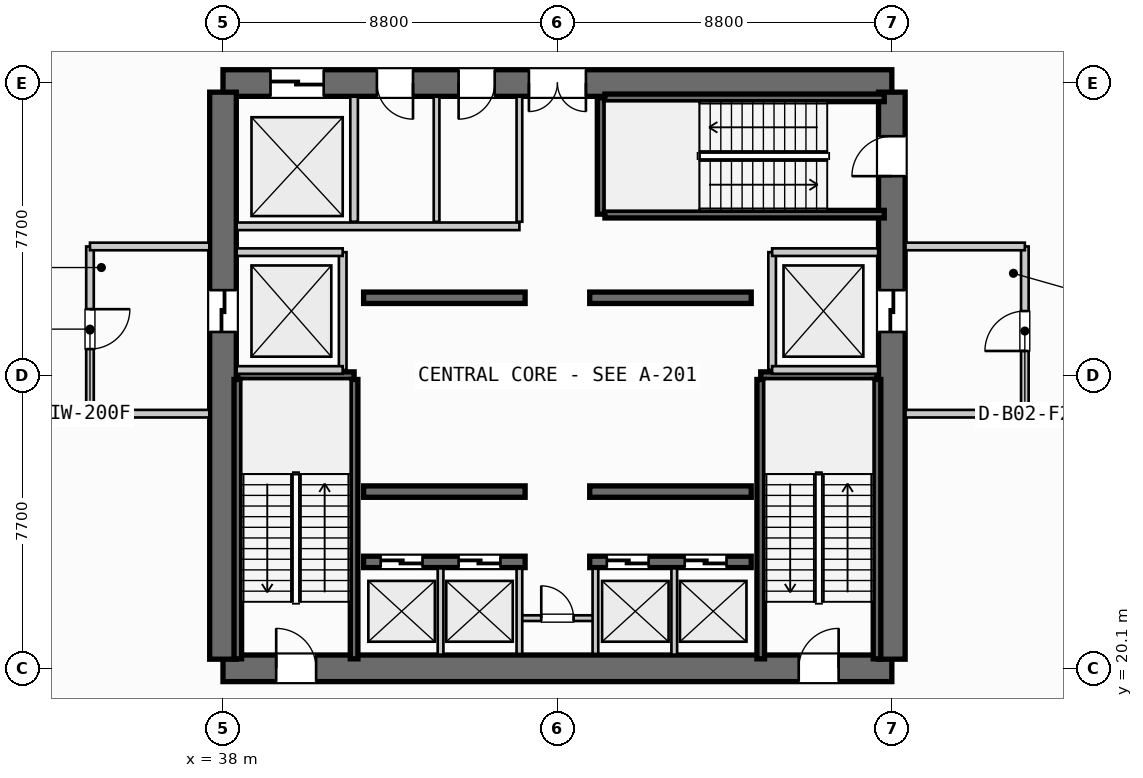
"""IFC4 building model, lengths in metres.
Left out: names, types, materials, properties, quantities, classifications, styles, units other than length and angle.
Written with IfcOpenShell. Run it as: python <this file> out.ifc"""

import sys

from ifc_helpers import new_model, si_unit, direction, frame, frame_2d, origin, place, context, subcontext, project, spatial, rectangle, extrude, source, transform, mapped, element, fill, save


model = new_model("IFC4")
c1 = context("Model", 3, precision=1e-05, world=origin(), true_north=direction((0.0, 1.0)))
c2 = subcontext(c1, "Body", "Model", "MODEL_VIEW")
j1 = project(units=[si_unit("LENGTHUNIT", "METRE"), si_unit("PLANEANGLEUNIT", "RADIAN")], contexts=[c1])
p1 = place(None, origin())
s1 = spatial("IfcSite", under=j1, at=p1, CompositionType="ELEMENT")
p2 = place(p1, origin())
s2 = spatial("IfcBuilding", under=s1, at=p2, CompositionType="ELEMENT")
p3 = place(p2, frame((0.0, 0.0, -9.0)))
s3 = spatial("IfcBuildingStorey", under=s2, at=p3, CompositionType="ELEMENT", Elevation=-9.0)
p4 = place(p3, frame((38.0, 20.1, 0.0), z_axis=(0.0, 0.0, 1.0), x_axis=(1.0, 0.0, 0.0)))
e1 = element("IfcWall", 1, at=p4, inside=s3, PredefinedType="SHEAR", context=c2, shape_type="SweptSolid", body=[
    extrude(rectangle(XDim=17.6, YDim=0.7, at=frame_2d((8.8, 0.0))), origin(), (0.0, 0.0, 1.0), 4.22),
])
p5 = place(p4, frame((1.4, 0.0, 0.0)))
e2 = element("IfcOpeningElement", 2, at=p5, cuts=e1, PredefinedType="OPENING", context=c2, shape_type="SweptSolid", body=[
    extrude(rectangle(XDim=1.05, YDim=2.15, at=frame_2d((0.525, 1.075))), frame((0.0, 0.36, 0.0), z_axis=(0.0, -1.0, 0.0), x_axis=(1.0, 0.0, 0.0)), (0.0, 0.0, 1.0), 0.72),
])
p6 = place(p4, frame((15.15, 0.0, 0.0)))
e3 = element("IfcOpeningElement", 3, at=p6, cuts=e1, PredefinedType="OPENING", context=c2, shape_type="SweptSolid", body=[
    extrude(rectangle(XDim=1.05, YDim=2.15, at=frame_2d((0.525, 1.075))), frame((0.0, 0.36, 0.0), z_axis=(0.0, -1.0, 0.0), x_axis=(1.0, 0.0, 0.0)), (0.0, 0.0, 1.0), 0.72),
])
p7 = place(p3, frame((55.6, 35.5, 0.0), z_axis=(0.0, 0.0, 1.0), x_axis=(-1.0, 0.0, 0.0)))
e4 = element("IfcWall", 4, at=p7, inside=s3, PredefinedType="SHEAR", context=c2, shape_type="SweptSolid", body=[
    extrude(rectangle(XDim=17.6, YDim=0.7, at=frame_2d((8.8, 0.0))), origin(), (0.0, 0.0, 1.0), 4.22),
])
p8 = place(p7, frame((8.05, 0.0, 0.0)))
e5 = element("IfcOpeningElement", 5, at=p8, cuts=e4, PredefinedType="OPENING", context=c2, shape_type="SweptSolid", body=[
    extrude(rectangle(XDim=1.5, YDim=2.2, at=frame_2d((0.75, 1.1))), frame((0.0, 0.36, 0.0), z_axis=(0.0, -1.0, 0.0), x_axis=(1.0, 0.0, 0.0)), (0.0, 0.0, 1.0), 0.72),
])
p9 = place(p7, frame((14.95, 0.0, 0.0)))
e6 = element("IfcOpeningElement", 6, at=p9, cuts=e4, PredefinedType="OPENING", context=c2, shape_type="SweptSolid", body=[
    extrude(rectangle(XDim=1.4, YDim=2.3, at=frame_2d((0.7, 1.15))), frame((0.0, 0.36, 0.0), z_axis=(0.0, -1.0, 0.0), x_axis=(1.0, 0.0, 0.0)), (0.0, 0.0, 1.0), 0.72),
])
p10 = place(p7, frame((12.6, 0.0, 0.0)))
e7 = element("IfcOpeningElement", 7, at=p10, cuts=e4, PredefinedType="OPENING", context=c2, shape_type="SweptSolid", body=[
    extrude(rectangle(XDim=0.95, YDim=2.15, at=frame_2d((0.475, 1.075))), frame((0.0, 0.36, 0.0), z_axis=(0.0, -1.0, 0.0), x_axis=(1.0, 0.0, 0.0)), (0.0, 0.0, 1.0), 0.72),
])
p11 = place(p7, frame((10.45, 0.0, 0.0)))
e8 = element("IfcOpeningElement", 8, at=p11, cuts=e4, PredefinedType="OPENING", context=c2, shape_type="SweptSolid", body=[
    extrude(rectangle(XDim=0.95, YDim=2.15, at=frame_2d((0.475, 1.075))), frame((0.0, 0.36, 0.0), z_axis=(0.0, -1.0, 0.0), x_axis=(1.0, 0.0, 0.0)), (0.0, 0.0, 1.0), 0.72),
])
p12 = place(p3, frame((38.0, 35.26, 0.0), z_axis=(0.0, 0.0, 1.0), x_axis=(0.0, -1.0, 0.0)))
e9 = element("IfcWall", 9, at=p12, inside=s3, PredefinedType="SHEAR", context=c2, shape_type="SweptSolid", body=[
    extrude(rectangle(XDim=14.92, YDim=0.7, at=frame_2d((7.46, 0.0))), origin(), (0.0, 0.0, 1.0), 4.22),
])
p13 = place(p12, frame((5.21, 0.0, 0.0)))
e10 = element("IfcOpeningElement", 10, at=p13, cuts=e9, PredefinedType="OPENING", context=c2, shape_type="SweptSolid", body=[
    extrude(rectangle(XDim=1.1, YDim=2.2, at=frame_2d((0.55, 1.1))), frame((0.0, 0.36, 0.0), z_axis=(0.0, -1.0, 0.0), x_axis=(1.0, 0.0, 0.0)), (0.0, 0.0, 1.0), 0.72),
])
p14 = place(p3, frame((55.6, 20.34, 0.0), z_axis=(0.0, 0.0, 1.0), x_axis=(0.0, 1.0, 0.0)))
e11 = element("IfcWall", 11, at=p14, inside=s3, PredefinedType="SHEAR", context=c2, shape_type="SweptSolid", body=[
    extrude(rectangle(XDim=14.92, YDim=0.7, at=frame_2d((7.46, 0.0))), origin(), (0.0, 0.0, 1.0), 4.22),
])
p15 = place(p14, frame((12.71, 0.0, 0.0)))
e12 = element("IfcOpeningElement", 12, at=p15, cuts=e11, PredefinedType="OPENING", context=c2, shape_type="SweptSolid", body=[
    extrude(rectangle(XDim=1.05, YDim=2.15, at=frame_2d((0.525, 1.075))), frame((0.0, 0.36, 0.0), z_axis=(0.0, -1.0, 0.0), x_axis=(1.0, 0.0, 0.0)), (0.0, 0.0, 1.0), 0.72),
])
p16 = place(p14, frame((8.61, 0.0, 0.0)))
e13 = element("IfcOpeningElement", 13, at=p16, cuts=e11, PredefinedType="OPENING", context=c2, shape_type="SweptSolid", body=[
    extrude(rectangle(XDim=1.1, YDim=2.2, at=frame_2d((0.55, 1.1))), frame((0.0, 0.36, 0.0), z_axis=(0.0, -1.0, 0.0), x_axis=(1.0, 0.0, 0.0)), (0.0, 0.0, 1.0), 0.72),
])
p17 = place(p3, frame((41.7, 22.9, 0.0), z_axis=(0.0, 0.0, 1.0), x_axis=(1.0, 0.0, 0.0)))
e14 = element("IfcWall", 14, at=p17, inside=s3, PredefinedType="SHEAR", context=c2, shape_type="SweptSolid", body=[
    extrude(rectangle(XDim=4.25, YDim=0.3, at=frame_2d((2.125, 0.0))), origin(), (0.0, 0.0, 1.0), 4.22),
])
p18 = place(p17, frame((0.45, 0.0, 0.0)))
e15 = element("IfcOpeningElement", 15, at=p18, cuts=e14, PredefinedType="OPENING", context=c2, shape_type="SweptSolid", body=[
    extrude(rectangle(XDim=1.1, YDim=2.2, at=frame_2d((0.55, 1.1))), frame((0.0, 0.16, 0.0), z_axis=(0.0, -1.0, 0.0), x_axis=(1.0, 0.0, 0.0)), (0.0, 0.0, 1.0), 0.32),
])
p19 = place(p17, frame((2.5, 0.0, 0.0)))
e16 = element("IfcOpeningElement", 16, at=p19, cuts=e14, PredefinedType="OPENING", context=c2, shape_type="SweptSolid", body=[
    extrude(rectangle(XDim=1.1, YDim=2.2, at=frame_2d((0.55, 1.1))), frame((0.0, 0.16, 0.0), z_axis=(0.0, -1.0, 0.0), x_axis=(1.0, 0.0, 0.0)), (0.0, 0.0, 1.0), 0.32),
])
p20 = place(p3, frame((47.65, 22.9, 0.0), z_axis=(0.0, 0.0, 1.0), x_axis=(1.0, 0.0, 0.0)))
e17 = element("IfcWall", 17, at=p20, inside=s3, PredefinedType="SHEAR", context=c2, shape_type="SweptSolid", body=[
    extrude(rectangle(XDim=4.25, YDim=0.3, at=frame_2d((2.125, 0.0))), origin(), (0.0, 0.0, 1.0), 4.22),
])
p21 = place(p20, frame((0.45, 0.0, 0.0)))
e18 = element("IfcOpeningElement", 18, at=p21, cuts=e17, PredefinedType="OPENING", context=c2, shape_type="SweptSolid", body=[
    extrude(rectangle(XDim=1.1, YDim=2.2, at=frame_2d((0.55, 1.1))), frame((0.0, 0.16, 0.0), z_axis=(0.0, -1.0, 0.0), x_axis=(1.0, 0.0, 0.0)), (0.0, 0.0, 1.0), 0.32),
])
p22 = place(p20, frame((2.5, 0.0, 0.0)))
e19 = element("IfcOpeningElement", 19, at=p22, cuts=e17, PredefinedType="OPENING", context=c2, shape_type="SweptSolid", body=[
    extrude(rectangle(XDim=1.1, YDim=2.2, at=frame_2d((0.55, 1.1))), frame((0.0, 0.16, 0.0), z_axis=(0.0, -1.0, 0.0), x_axis=(1.0, 0.0, 0.0)), (0.0, 0.0, 1.0), 0.32),
])
for number, where, z_axis, x_axis in (
    (20, (41.7, 24.75, 0.0), (0.0, 0.0, 1.0), (1.0, 0.0, 0.0)),
    (21, (47.65, 24.75, 0.0), (0.0, 0.0, 1.0), (1.0, 0.0, 0.0)),
    (22, (41.7, 29.85, 0.0), (0.0, 0.0, 1.0), (1.0, 0.0, 0.0)),
    (23, (47.65, 29.85, 0.0), (0.0, 0.0, 1.0), (1.0, 0.0, 0.0)),
):
    element("IfcWall", number, at=place(p3, frame(where, z_axis=z_axis, x_axis=x_axis)), inside=s3, PredefinedType="SHEAR", context=c2, shape_type="SweptSolid", body=[
        extrude(rectangle(XDim=4.25, YDim=0.3, at=frame_2d((2.125, 0.0))), origin(), (0.0, 0.0, 1.0), 4.22),
    ])
p23 = place(p3, frame((38.39, 27.8, 0.0), z_axis=(0.0, 0.0, 1.0), x_axis=(1.0, 0.0, 0.0)))
e24 = element("IfcWall", 24, at=p23, inside=s3, PredefinedType="SHEAR", context=c2, shape_type="SweptSolid", body=[
    extrude(rectangle(XDim=3.06, YDim=0.2, at=frame_2d((1.53, 0.0))), origin(), (0.0, 0.0, 1.0), 4.22),
])
for number, where, z_axis, x_axis in (
    (25, (41.45, 27.7, 0.0), (0.0, 0.0, 1.0), (0.0, -1.0, 0.0)),
    (26, (38.39, 20.35, 0.0), (0.0, 0.0, 1.0), (0.0, 1.0, 0.0)),
):
    element("IfcWall", number, at=place(p3, frame(where, z_axis=z_axis, x_axis=x_axis)), inside=s3, PredefinedType="SHEAR", context=c2, shape_type="SweptSolid", body=[
        extrude(rectangle(XDim=7.35, YDim=0.2, at=frame_2d((3.675, 0.0))), origin(), (0.0, 0.0, 1.0), 4.22),
    ])
p24 = place(p3, frame((52.15, 27.8, 0.0), z_axis=(0.0, 0.0, 1.0), x_axis=(1.0, 0.0, 0.0)))
e27 = element("IfcWall", 27, at=p24, inside=s3, PredefinedType="SHEAR", context=c2, shape_type="SweptSolid", body=[
    extrude(rectangle(XDim=3.06, YDim=0.2, at=frame_2d((1.53, 0.0))), origin(), (0.0, 0.0, 1.0), 4.22),
])
for number, where, z_axis, x_axis in (
    (28, (55.21, 27.7, 0.0), (0.0, 0.0, 1.0), (0.0, -1.0, 0.0)),
    (29, (52.15, 20.35, 0.0), (0.0, 0.0, 1.0), (0.0, 1.0, 0.0)),
):
    element("IfcWall", number, at=place(p3, frame(where, z_axis=z_axis, x_axis=x_axis)), inside=s3, PredefinedType="SHEAR", context=c2, shape_type="SweptSolid", body=[
        extrude(rectangle(XDim=7.35, YDim=0.2, at=frame_2d((3.675, 0.0))), origin(), (0.0, 0.0, 1.0), 4.22),
    ])
p25 = place(p3, frame((47.95, 32.05, 0.0), z_axis=(0.0, 0.0, 1.0), x_axis=(0.0, 1.0, 0.0)))
e30 = element("IfcWall", 30, at=p25, inside=s3, PredefinedType="SHEAR", context=c2, shape_type="SweptSolid", body=[
    extrude(rectangle(XDim=3.06, YDim=0.2, at=frame_2d((1.53, 0.0))), origin(), (0.0, 0.0, 1.0), 4.22),
])
for number, where, z_axis, x_axis in (
    (31, (48.05, 35.11, 0.0), (0.0, 0.0, 1.0), (1.0, 0.0, 0.0)),
    (32, (55.4, 32.05, 0.0), (0.0, 0.0, 1.0), (-1.0, 0.0, 0.0)),
):
    element("IfcWall", number, at=place(p3, frame(where, z_axis=z_axis, x_axis=x_axis)), inside=s3, PredefinedType="SHEAR", context=c2, shape_type="SweptSolid", body=[
        extrude(rectangle(XDim=7.35, YDim=0.2, at=frame_2d((3.675, 0.0))), origin(), (0.0, 0.0, 1.0), 4.22),
    ])
p26 = place(p3, frame((45.8, 21.42, 0.0), z_axis=(0.0, 0.0, 1.0), x_axis=(1.0, 0.0, 0.0)))
e33 = element("IfcWall", 33, at=p26, inside=s3, PredefinedType="PARTITIONING", context=c2, shape_type="SweptSolid", body=[
    extrude(rectangle(XDim=2.0, YDim=0.15, at=frame_2d((1.0, 0.0))), origin(), (0.0, 0.0, 1.0), 3.433),
])
p27 = place(p26, frame((0.575, 0.0, 0.0)))
e34 = element("IfcOpeningElement", 34, at=p27, cuts=e33, PredefinedType="OPENING", context=c2, shape_type="SweptSolid", body=[
    extrude(rectangle(XDim=0.85, YDim=2.15, at=frame_2d((0.425, 1.075))), frame((0.0, 0.085, 0.0), z_axis=(0.0, -1.0, 0.0), x_axis=(1.0, 0.0, 0.0)), (0.0, 0.0, 1.0), 0.17),
])
for number, where, z_axis, x_axis in (
    (35, (45.8, 20.48, 0.0), (0.0, 0.0, 1.0), (0.0, 1.0, 0.0)),
    (36, (47.8, 20.48, 0.0), (0.0, 0.0, 1.0), (0.0, 1.0, 0.0)),
):
    element("IfcWall", number, at=place(p3, frame(where, z_axis=z_axis, x_axis=x_axis)), inside=s3, PredefinedType="PARTITIONING", context=c2, shape_type="SweptSolid", body=[
        extrude(rectangle(XDim=2.24, YDim=0.15, at=frame_2d((1.12, 0.0))), origin(), (0.0, 0.0, 1.0), 3.433),
    ])
p28 = place(p3, frame((41.15, 27.95, 0.0), z_axis=(0.0, 0.0, 1.0), x_axis=(0.0, 1.0, 0.0)))
e37 = element("IfcWall", 37, at=p28, inside=s3, PredefinedType="PARTITIONING", context=c2, shape_type="SweptSolid", body=[
    extrude(rectangle(XDim=3.1, YDim=0.2, at=frame_2d((1.55, 0.0))), origin(), (0.0, 0.0, 1.0), 3.433),
])
for number, where, z_axis, x_axis in (
    (38, (38.36, 27.95, 0.0), (0.0, 0.0, 1.0), (1.0, 0.0, 0.0)),
    (39, (38.36, 31.05, 0.0), (0.0, 0.0, 1.0), (1.0, 0.0, 0.0)),
):
    element("IfcWall", number, at=place(p3, frame(where, z_axis=z_axis, x_axis=x_axis)), inside=s3, PredefinedType="PARTITIONING", context=c2, shape_type="SweptSolid", body=[
        extrude(rectangle(XDim=2.79, YDim=0.2, at=frame_2d((1.395, 0.0))), origin(), (0.0, 0.0, 1.0), 3.433),
    ])
p29 = place(p3, frame((34.5, 31.2, 0.0), z_axis=(0.0, 0.0, 1.0), x_axis=(0.0, -1.0, 0.0)))
e40 = element("IfcWall", 40, at=p29, inside=s3, PredefinedType="PARTITIONING", context=c2, shape_type="SweptSolid", body=[
    extrude(rectangle(XDim=4.4, YDim=0.2, at=frame_2d((2.2, 0.0))), origin(), (0.0, 0.0, 1.0), 3.433),
])
p30 = place(p29, frame((1.65, 0.0, 0.0)))
e41 = element("IfcOpeningElement", 41, at=p30, cuts=e40, PredefinedType="OPENING", context=c2, shape_type="SweptSolid", body=[
    extrude(rectangle(XDim=1.05, YDim=2.15, at=frame_2d((0.525, 1.075))), frame((0.0, 0.11, 0.0), z_axis=(0.0, -1.0, 0.0), x_axis=(1.0, 0.0, 0.0)), (0.0, 0.0, 1.0), 0.22),
])
for number, where, z_axis, x_axis in (
    (42, (34.5, 26.8, 0.0), (0.0, 0.0, 1.0), (1.0, 0.0, 0.0)),
    (43, (34.5, 31.2, 0.0), (0.0, 0.0, 1.0), (1.0, 0.0, 0.0)),
):
    element("IfcWall", number, at=place(p3, frame(where, z_axis=z_axis, x_axis=x_axis)), inside=s3, PredefinedType="PARTITIONING", context=c2, shape_type="SweptSolid", body=[
        extrude(rectangle(XDim=3.14, YDim=0.2, at=frame_2d((1.57, 0.0))), origin(), (0.0, 0.0, 1.0), 3.433),
    ])
p31 = place(p3, frame((52.45, 27.95, 0.0), z_axis=(0.0, 0.0, 1.0), x_axis=(0.0, 1.0, 0.0)))
e44 = element("IfcWall", 44, at=p31, inside=s3, PredefinedType="PARTITIONING", context=c2, shape_type="SweptSolid", body=[
    extrude(rectangle(XDim=3.1, YDim=0.2, at=frame_2d((1.55, 0.0))), origin(), (0.0, 0.0, 1.0), 3.433),
])
for number, where, z_axis, x_axis in (
    (45, (52.45, 27.95, 0.0), (0.0, 0.0, 1.0), (1.0, 0.0, 0.0)),
    (46, (52.45, 31.05, 0.0), (0.0, 0.0, 1.0), (1.0, 0.0, 0.0)),
):
    element("IfcWall", number, at=place(p3, frame(where, z_axis=z_axis, x_axis=x_axis)), inside=s3, PredefinedType="PARTITIONING", context=c2, shape_type="SweptSolid", body=[
        extrude(rectangle(XDim=2.79, YDim=0.2, at=frame_2d((1.395, 0.0))), origin(), (0.0, 0.0, 1.0), 3.433),
    ])
p32 = place(p3, frame((59.1, 26.8, 0.0), z_axis=(0.0, 0.0, 1.0), x_axis=(0.0, 1.0, 0.0)))
e47 = element("IfcWall", 47, at=p32, inside=s3, PredefinedType="PARTITIONING", context=c2, shape_type="SweptSolid", body=[
    extrude(rectangle(XDim=4.4, YDim=0.2, at=frame_2d((2.2, 0.0))), origin(), (0.0, 0.0, 1.0), 3.433),
])
p33 = place(p32, frame((1.65, 0.0, 0.0)))
e48 = element("IfcOpeningElement", 48, at=p33, cuts=e47, PredefinedType="OPENING", context=c2, shape_type="SweptSolid", body=[
    extrude(rectangle(XDim=1.05, YDim=2.15, at=frame_2d((0.525, 1.075))), frame((0.0, 0.11, 0.0), z_axis=(0.0, -1.0, 0.0), x_axis=(1.0, 0.0, 0.0)), (0.0, 0.0, 1.0), 0.22),
])
for number, where, z_axis, x_axis in (
    (49, (55.96, 26.8, 0.0), (0.0, 0.0, 1.0), (1.0, 0.0, 0.0)),
    (50, (55.96, 31.2, 0.0), (0.0, 0.0, 1.0), (1.0, 0.0, 0.0)),
):
    element("IfcWall", number, at=place(p3, frame(where, z_axis=z_axis, x_axis=x_axis)), inside=s3, PredefinedType="PARTITIONING", context=c2, shape_type="SweptSolid", body=[
        extrude(rectangle(XDim=3.14, YDim=0.2, at=frame_2d((1.57, 0.0))), origin(), (0.0, 0.0, 1.0), 3.433),
    ])
for number, where, z_axis, x_axis in (
    (51, (43.725, 20.46, 0.0), (0.0, 0.0, 1.0), (0.0, 1.0, 0.0)),
    (52, (49.875, 20.46, 0.0), (0.0, 0.0, 1.0), (0.0, 1.0, 0.0)),
):
    element("IfcWall", number, at=place(p3, frame(where, z_axis=z_axis, x_axis=x_axis)), inside=s3, PredefinedType="PARTITIONING", context=c2, shape_type="SweptSolid", body=[
        extrude(rectangle(XDim=2.27, YDim=0.15, at=frame_2d((1.135, 0.0))), origin(), (0.0, 0.0, 1.0), 3.433),
    ])
p34 = place(p3, frame((41.45, 31.85, 0.0), z_axis=(0.0, 0.0, 1.0), x_axis=(0.0, 1.0, 0.0)))
e53 = element("IfcWall", 53, at=p34, inside=s3, PredefinedType="PARTITIONING", context=c2, shape_type="SweptSolid", body=[
    extrude(rectangle(XDim=3.29, YDim=0.2, at=frame_2d((1.645, 0.0))), origin(), (0.0, 0.0, 1.0), 3.433),
])
p35 = place(p3, frame((38.36, 31.73, 0.0), z_axis=(0.0, 0.0, 1.0), x_axis=(1.0, 0.0, 0.0)))
e54 = element("IfcWall", 54, at=p35, inside=s3, PredefinedType="PARTITIONING", context=c2, shape_type="SweptSolid", body=[
    extrude(rectangle(XDim=7.44, YDim=0.2, at=frame_2d((3.72, 0.0))), origin(), (0.0, 0.0, 1.0), 3.433),
])
p36 = place(p3, frame((45.8, 31.85, 0.0), z_axis=(0.0, 0.0, 1.0), x_axis=(0.0, 1.0, 0.0)))
e55 = element("IfcWall", 55, at=p36, inside=s3, PredefinedType="PARTITIONING", context=c2, shape_type="SweptSolid", body=[
    extrude(rectangle(XDim=3.29, YDim=0.15, at=frame_2d((1.645, 0.0))), origin(), (0.0, 0.0, 1.0), 3.433),
])
p37 = place(p3, frame((43.62, 31.85, 0.0), z_axis=(0.0, 0.0, 1.0), x_axis=(0.0, 1.0, 0.0)))
e56 = element("IfcWall", 56, at=p37, inside=s3, PredefinedType="PLUMBINGWALL", context=c2, shape_type="SweptSolid", body=[
    extrude(rectangle(XDim=3.29, YDim=0.15, at=frame_2d((1.645, 0.0))), origin(), (0.0, 0.0, 1.0), 3.433),
])
m1 = source(origin(), c2, "Body", "SweptSolid", [
    extrude(rectangle(XDim=1.05, YDim=2.15, at=frame_2d((0.525, 1.075))), frame((0.0, 0.025, 0.0), z_axis=(0.0, -1.0, 0.0), x_axis=(1.0, 0.0, 0.0)), (0.0, 0.0, 1.0), 0.05),
])
p38 = place(p5, origin())
e57 = element("IfcDoor", 57, at=p38, inside=s3, OperationType="SINGLE_SWING_LEFT", PredefinedType="DOOR", context=c2, shape_type="MappedRepresentation", body=[
    mapped(m1, transform((0.0, 0.0, 0.0), scale=1.0)),
])
fill(e2, e57)
p39 = place(p6, origin())
e58 = element("IfcDoor", 58, at=p39, inside=s3, OperationType="SINGLE_SWING_RIGHT", PredefinedType="DOOR", context=c2, shape_type="MappedRepresentation", body=[
    mapped(m1, transform((0.0, 0.0, 0.0), scale=1.0)),
])
fill(e3, e58)
p40 = place(p15, origin())
e59 = element("IfcDoor", 59, at=p40, inside=s3, OperationType="SINGLE_SWING_LEFT", PredefinedType="DOOR", context=c2, shape_type="MappedRepresentation", body=[
    mapped(m1, transform((0.0, 0.0, 0.0), scale=1.0)),
])
fill(e12, e59)
m2 = source(origin(), c2, "Body", "SweptSolid", [
    extrude(rectangle(XDim=1.5, YDim=2.2, at=frame_2d((0.75, 1.1))), frame((0.0, 0.025, 0.0), z_axis=(0.0, -1.0, 0.0), x_axis=(1.0, 0.0, 0.0)), (0.0, 0.0, 1.0), 0.05),
])
p41 = place(p8, origin())
e60 = element("IfcDoor", 60, at=p41, inside=s3, OperationType="DOUBLE_DOOR_SINGLE_SWING", PredefinedType="DOOR", context=c2, shape_type="MappedRepresentation", body=[
    mapped(m2, transform((0.0, 0.0, 0.0), scale=1.0)),
])
fill(e5, e60)
m3 = source(origin(), c2, "Body", "SweptSolid", [
    extrude(rectangle(XDim=1.1, YDim=2.2, at=frame_2d((0.55, 1.1))), frame((0.0, 0.025, 0.0), z_axis=(0.0, -1.0, 0.0), x_axis=(1.0, 0.0, 0.0)), (0.0, 0.0, 1.0), 0.05),
])
p42 = place(p13, origin())
e61 = element("IfcDoor", 61, at=p42, inside=s3, OperationType="SLIDING_TO_LEFT", PredefinedType="DOOR", context=c2, shape_type="MappedRepresentation", body=[
    mapped(m3, transform((0.0, 0.0, 0.0), scale=1.0)),
])
fill(e10, e61)
p43 = place(p16, origin())
e62 = element("IfcDoor", 62, at=p43, inside=s3, OperationType="SLIDING_TO_RIGHT", PredefinedType="DOOR", context=c2, shape_type="MappedRepresentation", body=[
    mapped(m3, transform((0.0, 0.0, 0.0), scale=1.0)),
])
fill(e13, e62)
p44 = place(p18, origin())
e63 = element("IfcDoor", 63, at=p44, inside=s3, OperationType="SLIDING_TO_LEFT", PredefinedType="DOOR", context=c2, shape_type="MappedRepresentation", body=[
    mapped(m3, transform((0.0, 0.0, 0.0), scale=1.0)),
])
fill(e15, e63)
p45 = place(p19, origin())
e64 = element("IfcDoor", 64, at=p45, inside=s3, OperationType="SLIDING_TO_LEFT", PredefinedType="DOOR", context=c2, shape_type="MappedRepresentation", body=[
    mapped(m3, transform((0.0, 0.0, 0.0), scale=1.0)),
])
fill(e16, e64)
p46 = place(p21, origin())
e65 = element("IfcDoor", 65, at=p46, inside=s3, OperationType="SLIDING_TO_LEFT", PredefinedType="DOOR", context=c2, shape_type="MappedRepresentation", body=[
    mapped(m3, transform((0.0, 0.0, 0.0), scale=1.0)),
])
fill(e18, e65)
p47 = place(p22, origin())
e66 = element("IfcDoor", 66, at=p47, inside=s3, OperationType="SLIDING_TO_LEFT", PredefinedType="DOOR", context=c2, shape_type="MappedRepresentation", body=[
    mapped(m3, transform((0.0, 0.0, 0.0), scale=1.0)),
])
fill(e19, e66)
m4 = source(origin(), c2, "Body", "SweptSolid", [
    extrude(rectangle(XDim=1.4, YDim=2.3, at=frame_2d((0.7, 1.15))), frame((0.0, 0.025, 0.0), z_axis=(0.0, -1.0, 0.0), x_axis=(1.0, 0.0, 0.0)), (0.0, 0.0, 1.0), 0.05),
])
p48 = place(p9, origin())
e67 = element("IfcDoor", 67, at=p48, inside=s3, OperationType="SLIDING_TO_RIGHT", PredefinedType="DOOR", context=c2, shape_type="MappedRepresentation", body=[
    mapped(m4, transform((0.0, 0.0, 0.0), scale=1.0)),
])
fill(e6, e67)
m5 = source(origin(), c2, "Body", "SweptSolid", [
    extrude(rectangle(XDim=0.95, YDim=2.15, at=frame_2d((0.475, 1.075))), frame((0.0, 0.025, 0.0), z_axis=(0.0, -1.0, 0.0), x_axis=(1.0, 0.0, 0.0)), (0.0, 0.0, 1.0), 0.05),
])
p49 = place(p10, origin())
e68 = element("IfcDoor", 68, at=p49, inside=s3, OperationType="SINGLE_SWING_LEFT", PredefinedType="DOOR", context=c2, shape_type="MappedRepresentation", body=[
    mapped(m5, transform((0.0, 0.0, 0.0), scale=1.0)),
])
fill(e7, e68)
p50 = place(p11, origin())
e69 = element("IfcDoor", 69, at=p50, inside=s3, OperationType="SINGLE_SWING_RIGHT", PredefinedType="DOOR", context=c2, shape_type="MappedRepresentation", body=[
    mapped(m5, transform((0.0, 0.0, 0.0), scale=1.0)),
])
fill(e8, e69)
p51 = place(p30, origin())
e70 = element("IfcDoor", 70, at=p51, inside=s3, OperationType="SINGLE_SWING_LEFT", PredefinedType="DOOR", context=c2, shape_type="MappedRepresentation", body=[
    mapped(m1, transform((0.0, 0.0, 0.0), scale=1.0)),
])
fill(e41, e70)
p52 = place(p33, origin())
e71 = element("IfcDoor", 71, at=p52, inside=s3, OperationType="SINGLE_SWING_LEFT", PredefinedType="DOOR", context=c2, shape_type="MappedRepresentation", body=[
    mapped(m1, transform((0.0, 0.0, 0.0), scale=1.0)),
])
fill(e48, e71)
m6 = source(origin(), c2, "Body", "SweptSolid", [
    extrude(rectangle(XDim=0.85, YDim=2.15, at=frame_2d((0.425, 1.075))), frame((0.0, 0.025, 0.0), z_axis=(0.0, -1.0, 0.0), x_axis=(1.0, 0.0, 0.0)), (0.0, 0.0, 1.0), 0.05),
])
p53 = place(p27, origin())
e72 = element("IfcDoor", 72, at=p53, inside=s3, OperationType="SINGLE_SWING_LEFT", PredefinedType="DOOR", context=c2, shape_type="MappedRepresentation", body=[
    mapped(m6, transform((0.0, 0.0, 0.0), scale=1.0)),
])
fill(e34, e72)
save(model, sys.argv[1])
